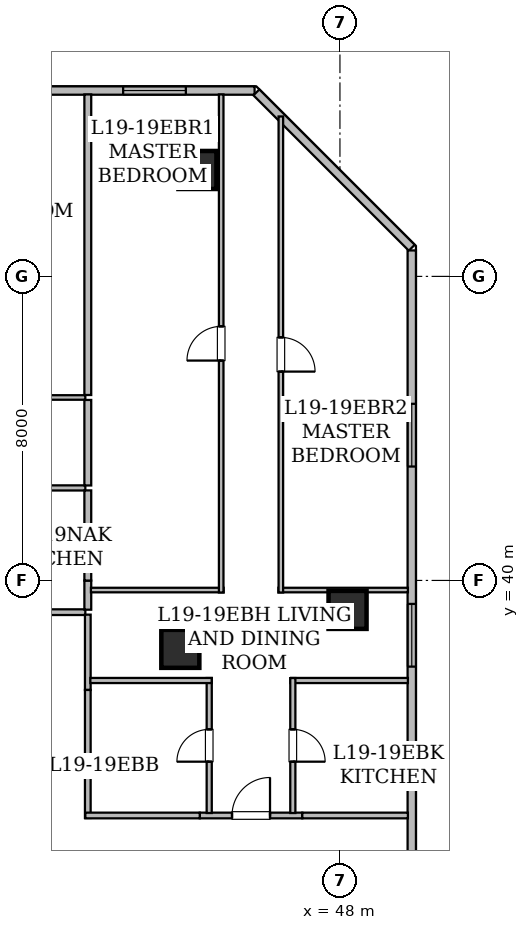
"""IFC4 building model, lengths in metres.
Left out: names, types, materials, properties, quantities, classifications, styles, units other than length and angle.
Written with IfcOpenShell. Run it as: python <this file> out.ifc"""

import sys

from ifc_helpers import new_model, si_unit, direction, frame, frame_2d, origin, origin_2d, place, context, subcontext, project, spatial, rectangle, hollow_rectangle, extrude, element, fill, save


model = new_model("IFC4")
c1 = context("Model", 3, precision=1e-05, world=origin(), true_north=direction((0.0, 1.0)))
c2 = subcontext(c1, "Body", "Model", "MODEL_VIEW")
j1 = project(units=[si_unit("LENGTHUNIT", "METRE"), si_unit("PLANEANGLEUNIT", "RADIAN")], contexts=[c1])
p1 = place(None, origin())
s1 = spatial("IfcSite", under=j1, at=p1, CompositionType="ELEMENT")
p2 = place(p1, origin())
s2 = spatial("IfcBuilding", under=s1, at=p2, CompositionType="ELEMENT")
p3 = place(p2, frame((0.0, 0.0, 77.1)))
s3 = spatial("IfcBuildingStorey", under=s2, at=p3, CompositionType="ELEMENT", Elevation=77.1)
for number, where, z_axis, x_axis in (
    (1, (44.25, 50.8, 0.0), (0.0, 0.0, 1.0), (1.0, 0.0, 0.0)),
    (2, (48.2, 39.225, 0.0), (0.0, 0.0, 1.0), (1.0, 0.0, 0.0)),
    (3, (43.8, 38.2, 0.0), (0.0, 0.0, 1.0), (1.0, 0.0, 0.0)),
):
    element("IfcColumn", number, at=place(p3, frame(where, z_axis=z_axis, x_axis=x_axis)), inside=s3, PredefinedType="COLUMN", context=c2, shape_type="SweptSolid", body=[
        extrude(hollow_rectangle(XDim=1.0, YDim=1.0, WallThickness=0.05, at=origin_2d()), origin(), (0.0, 0.0, 1.0), 3.65),
    ])
p4 = place(p3, frame((8.315, 52.89, 0.0), z_axis=(0.0, 0.0, 1.0), x_axis=(1.0, 0.0, 0.0)))
e4 = element("IfcWall", 4, at=p4, inside=s3, PredefinedType="STANDARD", context=c2, shape_type="SweptSolid", body=[
    extrude(rectangle(XDim=37.439, YDim=0.22, at=frame_2d((18.719, 0.0))), origin(), (0.0, 0.0, 1.0), 3.43),
])
p5 = place(p4, frame((5.093, 0.0, 0.85)))
e5 = element("IfcOpeningElement", 5, at=p5, cuts=e4, PredefinedType="OPENING", context=c2, shape_type="SweptSolid", body=[
    extrude(rectangle(XDim=1.65, YDim=1.55, at=frame_2d((0.825, 0.775))), frame((0.0, 0.12, 0.0), z_axis=(0.0, -1.0, 0.0), x_axis=(1.0, 0.0, 0.0)), (0.0, 0.0, 1.0), 0.24),
])
p6 = place(p4, frame((13.055, 0.0, 0.8)))
e6 = element("IfcOpeningElement", 6, at=p6, cuts=e4, PredefinedType="OPENING", context=c2, shape_type="SweptSolid", body=[
    extrude(rectangle(XDim=1.2, YDim=1.5, at=frame_2d((0.6, 0.75))), frame((0.0, 0.12, 0.0), z_axis=(0.0, -1.0, 0.0), x_axis=(1.0, 0.0, 0.0)), (0.0, 0.0, 1.0), 0.24),
])
p7 = place(p4, frame((10.005, 0.0, 0.85)))
e7 = element("IfcOpeningElement", 7, at=p7, cuts=e4, PredefinedType="OPENING", context=c2, shape_type="SweptSolid", body=[
    extrude(rectangle(XDim=1.65, YDim=1.55, at=frame_2d((0.825, 0.775))), frame((0.0, 0.12, 0.0), z_axis=(0.0, -1.0, 0.0), x_axis=(1.0, 0.0, 0.0)), (0.0, 0.0, 1.0), 0.24),
])
p8 = place(p4, frame((15.655, 0.0, 0.85)))
e8 = element("IfcOpeningElement", 8, at=p8, cuts=e4, PredefinedType="OPENING", context=c2, shape_type="SweptSolid", body=[
    extrude(rectangle(XDim=1.65, YDim=1.55, at=frame_2d((0.825, 0.775))), frame((0.0, 0.12, 0.0), z_axis=(0.0, -1.0, 0.0), x_axis=(1.0, 0.0, 0.0)), (0.0, 0.0, 1.0), 0.24),
])
p9 = place(p4, frame((25.185, 0.0, 0.8)))
e9 = element("IfcOpeningElement", 9, at=p9, cuts=e4, PredefinedType="OPENING", context=c2, shape_type="SweptSolid", body=[
    extrude(rectangle(XDim=1.2, YDim=1.5, at=frame_2d((0.6, 0.75))), frame((0.0, 0.12, 0.0), z_axis=(0.0, -1.0, 0.0), x_axis=(1.0, 0.0, 0.0)), (0.0, 0.0, 1.0), 0.24),
])
p10 = place(p4, frame((20.935, 0.0, 0.85)))
e10 = element("IfcOpeningElement", 10, at=p10, cuts=e4, PredefinedType="OPENING", context=c2, shape_type="SweptSolid", body=[
    extrude(rectangle(XDim=1.65, YDim=1.55, at=frame_2d((0.825, 0.775))), frame((0.0, 0.12, 0.0), z_axis=(0.0, -1.0, 0.0), x_axis=(1.0, 0.0, 0.0)), (0.0, 0.0, 1.0), 0.24),
])
p11 = place(p4, frame((28.985, 0.0, 0.85)))
e11 = element("IfcOpeningElement", 11, at=p11, cuts=e4, PredefinedType="OPENING", context=c2, shape_type="SweptSolid", body=[
    extrude(rectangle(XDim=1.65, YDim=1.55, at=frame_2d((0.825, 0.775))), frame((0.0, 0.12, 0.0), z_axis=(0.0, -1.0, 0.0), x_axis=(1.0, 0.0, 0.0)), (0.0, 0.0, 1.0), 0.24),
])
p12 = place(p4, frame((33.98, 0.0, 0.85)))
e12 = element("IfcOpeningElement", 12, at=p12, cuts=e4, PredefinedType="OPENING", context=c2, shape_type="SweptSolid", body=[
    extrude(rectangle(XDim=1.65, YDim=1.55, at=frame_2d((0.825, 0.775))), frame((0.0, 0.12, 0.0), z_axis=(0.0, -1.0, 0.0), x_axis=(1.0, 0.0, 0.0)), (0.0, 0.0, 1.0), 0.24),
])
p13 = place(p3, frame((45.802, 52.842, 0.0), z_axis=(0.0, 0.0, 1.0), x_axis=(0.707085666273, -0.70712789547, 0.0)))
e13 = element("IfcWall", 13, at=p13, inside=s3, PredefinedType="STANDARD", context=c2, shape_type="SweptSolid", body=[
    extrude(rectangle(XDim=5.781, YDim=0.22, at=frame_2d((2.891, 0.0))), origin(), (0.0, 0.0, 1.0), 3.43),
])
p14 = place(p3, frame((49.89, 48.683, 0.0), z_axis=(0.0, 0.0, 1.0), x_axis=(0.0, -1.0, 0.0)))
e14 = element("IfcWall", 14, at=p14, inside=s3, PredefinedType="STANDARD", context=c2, shape_type="SweptSolid", body=[
    extrude(rectangle(XDim=17.446, YDim=0.22, at=frame_2d((8.723, 0.0))), origin(), (0.0, 0.0, 1.0), 3.43),
])
p15 = place(p14, frame((9.301, 0.0, 0.85)))
e15 = element("IfcOpeningElement", 15, at=p15, cuts=e14, PredefinedType="OPENING", context=c2, shape_type="SweptSolid", body=[
    extrude(rectangle(XDim=1.65, YDim=1.55, at=frame_2d((0.825, 0.775))), frame((0.0, 0.12, 0.0), z_axis=(0.0, -1.0, 0.0), x_axis=(1.0, 0.0, 0.0)), (0.0, 0.0, 1.0), 0.24),
])
p16 = place(p14, frame((4.036, 0.0, 0.85)))
e16 = element("IfcOpeningElement", 16, at=p16, cuts=e14, PredefinedType="OPENING", context=c2, shape_type="SweptSolid", body=[
    extrude(rectangle(XDim=1.65, YDim=1.55, at=frame_2d((0.825, 0.775))), frame((0.0, 0.12, 0.0), z_axis=(0.0, -1.0, 0.0), x_axis=(1.0, 0.0, 0.0)), (0.0, 0.0, 1.0), 0.24),
])
p17 = place(p3, frame((34.299, 39.165, 0.0), z_axis=(0.0, 0.0, 1.0), x_axis=(1.0, 0.0, 0.0)))
e17 = element("IfcWall", 17, at=p17, inside=s3, PredefinedType="STANDARD", context=c2, shape_type="SweptSolid", body=[
    extrude(rectangle(XDim=7.001, YDim=0.15, at=frame_2d((3.5, 0.0))), origin(), (0.0, 0.0, 1.0), 3.43),
])
p18 = place(p3, frame((41.365, 39.1, 0.0), z_axis=(0.0, 0.0, 1.0), x_axis=(0.0, -1.0, 0.0)))
e18 = element("IfcWall", 18, at=p18, inside=s3, PredefinedType="STANDARD", context=c2, shape_type="SweptSolid", body=[
    extrude(rectangle(XDim=1.982, YDim=0.15, at=frame_2d((0.991, 0.0))), origin(), (0.0, 0.0, 1.0), 2.647),
])
p19 = place(p3, frame((44.311, 33.815, 0.0), z_axis=(0.0, 0.0, 1.0), x_axis=(1.0, 0.0, 0.0)))
e19 = element("IfcWall", 19, at=p19, inside=s3, PredefinedType="STANDARD", context=c2, shape_type="SweptSolid", body=[
    extrude(rectangle(XDim=2.698, YDim=0.15, at=frame_2d((1.349, 0.0))), origin(), (0.0, 0.0, 1.0), 3.43),
])
p20 = place(p19, frame((0.849, 0.0, 0.0)))
e20 = element("IfcOpeningElement", 20, at=p20, cuts=e19, PredefinedType="OPENING", context=c2, shape_type="SweptSolid", body=[
    extrude(rectangle(XDim=1.0, YDim=2.15, at=frame_2d((0.5, 1.075))), frame((0.0, 0.085, 0.0), z_axis=(0.0, -1.0, 0.0), x_axis=(1.0, 0.0, 0.0)), (0.0, 0.0, 1.0), 0.17),
])
p21 = place(p3, frame((41.365, 37.118, 0.0), z_axis=(0.0, 0.0, 1.0), x_axis=(0.0, -1.0, 0.0)))
e21 = element("IfcWall", 21, at=p21, inside=s3, PredefinedType="STANDARD", context=c2, shape_type="SweptSolid", body=[
    extrude(rectangle(XDim=3.368, YDim=0.15, at=frame_2d((1.684, 0.0))), origin(), (0.0, 0.0, 1.0), 3.43),
])
p22 = place(p3, frame((41.3, 33.815, 0.0), z_axis=(0.0, 0.0, 1.0), x_axis=(1.0, 0.0, 0.0)))
e22 = element("IfcWall", 22, at=p22, inside=s3, PredefinedType="STANDARD", context=c2, shape_type="SweptSolid", body=[
    extrude(rectangle(XDim=3.011, YDim=0.15, at=frame_2d((1.505, 0.0))), origin(), (0.0, 0.0, 1.0), 2.647),
])
p23 = place(p3, frame((47.009, 33.815, 0.0), z_axis=(0.0, 0.0, 1.0), x_axis=(1.0, 0.0, 0.0)))
e23 = element("IfcWall", 23, at=p23, inside=s3, PredefinedType="STANDARD", context=c2, shape_type="SweptSolid", body=[
    extrude(rectangle(XDim=2.779, YDim=0.15, at=frame_2d((1.39, 0.0))), origin(), (0.0, 0.0, 1.0), 2.803),
])
p24 = place(p3, frame((41.3, 42.434, 0.0), z_axis=(0.0, 0.0, 1.0), x_axis=(-1.0, 0.0, 0.0)))
e24 = element("IfcWall", 24, at=p24, inside=s3, PredefinedType="PARTITIONING", context=c2, shape_type="SweptSolid", body=[
    extrude(rectangle(XDim=7.315, YDim=0.135, at=frame_2d((3.657, 0.0))), origin(), (0.0, 0.0, 1.0), 2.961),
])
p25 = place(p24, frame((3.233, 0.0, 0.0)))
e25 = element("IfcOpeningElement", 25, at=p25, cuts=e24, PredefinedType="OPENING", context=c2, shape_type="SweptSolid", body=[
    extrude(rectangle(XDim=0.85, YDim=2.1, at=frame_2d((0.425, 1.05))), frame((0.0, 0.077, 0.0), z_axis=(0.0, -1.0, 0.0), x_axis=(1.0, 0.0, 0.0)), (0.0, 0.0, 1.0), 0.155),
])
p26 = place(p3, frame((34.82, 44.814, 0.0), z_axis=(0.0, 0.0, 1.0), x_axis=(1.0, 0.0, 0.0)))
e26 = element("IfcWall", 26, at=p26, inside=s3, PredefinedType="PARTITIONING", context=c2, shape_type="SweptSolid", body=[
    extrude(rectangle(XDim=6.48, YDim=0.12, at=frame_2d((3.24, 0.0))), origin(), (0.0, 0.0, 1.0), 3.43),
])
p27 = place(p3, frame((41.365, 44.749, 0.0), z_axis=(0.0, 0.0, 1.0), x_axis=(0.0, -1.0, 0.0)))
e27 = element("IfcWall", 27, at=p27, inside=s3, PredefinedType="STANDARD", context=c2, shape_type="SweptSolid", body=[
    extrude(rectangle(XDim=2.25, YDim=0.18, at=frame_2d((1.125, 0.0))), origin(), (0.0, 0.0, 1.0), 2.961),
])
p28 = place(p3, frame((41.365, 39.996, 0.0), z_axis=(0.0, 0.0, 1.0), x_axis=(0.0, -1.0, 0.0)))
e28 = element("IfcWall", 28, at=p28, inside=s3, PredefinedType="STANDARD", context=c2, shape_type="SweptSolid", body=[
    extrude(rectangle(XDim=0.766, YDim=0.18, at=frame_2d((0.383, 0.0))), origin(), (0.0, 0.0, 1.0), 3.43),
])
p29 = place(p3, frame((41.365, 42.369, 0.0), z_axis=(0.0, 0.0, 1.0), x_axis=(0.0, -1.0, 0.0)))
e29 = element("IfcWall", 29, at=p29, inside=s3, PredefinedType="STANDARD", context=c2, shape_type="SweptSolid", body=[
    extrude(rectangle(XDim=2.373, YDim=0.18, at=frame_2d((1.187, 0.0))), origin(), (0.0, 0.0, 1.0), 3.43),
])
p30 = place(p3, frame((41.365, 52.788, 0.0), z_axis=(0.0, 0.0, 1.0), x_axis=(0.0, -1.0, 0.0)))
e30 = element("IfcWall", 30, at=p30, inside=s3, PredefinedType="STANDARD", context=c2, shape_type="SweptSolid", body=[
    extrude(rectangle(XDim=7.909, YDim=0.18, at=frame_2d((3.955, 0.0))), origin(), (0.0, 0.0, 1.0), 2.803),
])
p31 = place(p3, frame((44.56, 33.88, 0.0), z_axis=(0.0, 0.0, 1.0), x_axis=(0.0, 1.0, 0.0)))
e31 = element("IfcWall", 31, at=p31, inside=s3, PredefinedType="PARTITIONING", context=c2, shape_type="SweptSolid", body=[
    extrude(rectangle(XDim=3.552, YDim=0.135, at=frame_2d((1.776, 0.0))), origin(), (0.0, 0.0, 1.0), 3.43),
])
p32 = place(p31, frame((1.351, 0.0, 0.0)))
e32 = element("IfcOpeningElement", 32, at=p32, cuts=e31, PredefinedType="OPENING", context=c2, shape_type="SweptSolid", body=[
    extrude(rectangle(XDim=0.85, YDim=2.1, at=frame_2d((0.425, 1.05))), frame((0.0, 0.077, 0.0), z_axis=(0.0, -1.0, 0.0), x_axis=(1.0, 0.0, 0.0)), (0.0, 0.0, 1.0), 0.155),
])
p33 = place(p3, frame((44.625, 37.367, 0.0), z_axis=(0.0, 0.0, 1.0), x_axis=(-1.0, 0.0, 0.0)))
e33 = element("IfcWall", 33, at=p33, inside=s3, PredefinedType="PARTITIONING", context=c2, shape_type="SweptSolid", body=[
    extrude(rectangle(XDim=3.193, YDim=0.135, at=frame_2d((1.597, 0.0))), origin(), (0.0, 0.0, 1.0), 2.647),
])
p34 = place(p3, frame((49.788, 37.367, 0.0), z_axis=(0.0, 0.0, 1.0), x_axis=(-1.0, 0.0, 0.0)))
e34 = element("IfcWall", 34, at=p34, inside=s3, PredefinedType="PARTITIONING", context=c2, shape_type="SweptSolid", body=[
    extrude(rectangle(XDim=3.093, YDim=0.135, at=frame_2d((1.546, 0.0))), origin(), (0.0, 0.0, 1.0), 2.803),
])
p35 = place(p3, frame((46.76, 37.432, 0.0), z_axis=(0.0, 0.0, 1.0), x_axis=(0.0, -1.0, 0.0)))
e35 = element("IfcWall", 35, at=p35, inside=s3, PredefinedType="PARTITIONING", context=c2, shape_type="SweptSolid", body=[
    extrude(rectangle(XDim=3.552, YDim=0.135, at=frame_2d((1.776, 0.0))), origin(), (0.0, 0.0, 1.0), 3.43),
])
p36 = place(p35, frame((1.351, 0.0, 0.0)))
e36 = element("IfcOpeningElement", 36, at=p36, cuts=e35, PredefinedType="OPENING", context=c2, shape_type="SweptSolid", body=[
    extrude(rectangle(XDim=0.85, YDim=2.1, at=frame_2d((0.425, 1.05))), frame((0.0, 0.077, 0.0), z_axis=(0.0, -1.0, 0.0), x_axis=(1.0, 0.0, 0.0)), (0.0, 0.0, 1.0), 0.155),
])
p37 = place(p3, frame((41.447, 39.747, 0.0), z_axis=(0.0, 0.0, 1.0), x_axis=(1.0, 0.0, 0.0)))
e37 = element("IfcWall", 37, at=p37, inside=s3, PredefinedType="PARTITIONING", context=c2, shape_type="SweptSolid", body=[
    extrude(rectangle(XDim=3.493, YDim=0.12, at=frame_2d((1.747, 0.0))), origin(), (0.0, 0.0, 1.0), 2.647),
])
p38 = place(p3, frame((44.875, 39.682, 0.0), z_axis=(0.0, 0.0, 1.0), x_axis=(0.0, 1.0, 0.0)))
e38 = element("IfcWall", 38, at=p38, inside=s3, PredefinedType="PARTITIONING", context=c2, shape_type="SweptSolid", body=[
    extrude(rectangle(XDim=13.106, YDim=0.12, at=frame_2d((6.553, 0.0))), origin(), (0.0, 0.0, 1.0), 2.803),
])
p39 = place(p38, frame((6.103, 0.0, 0.0)))
e39 = element("IfcOpeningElement", 39, at=p39, cuts=e38, PredefinedType="OPENING", context=c2, shape_type="SweptSolid", body=[
    extrude(rectangle(XDim=0.9, YDim=2.1, at=frame_2d((0.45, 1.05))), frame((0.0, 0.07, 0.0), z_axis=(0.0, -1.0, 0.0), x_axis=(1.0, 0.0, 0.0)), (0.0, 0.0, 1.0), 0.14),
])
p40 = place(p3, frame((46.38, 39.747, 0.0), z_axis=(0.0, 0.0, 1.0), x_axis=(1.0, 0.0, 0.0)))
e40 = element("IfcWall", 40, at=p40, inside=s3, PredefinedType="PARTITIONING", context=c2, shape_type="SweptSolid", body=[
    extrude(rectangle(XDim=3.408, YDim=0.12, at=frame_2d((1.704, 0.0))), origin(), (0.0, 0.0, 1.0), 2.803),
])
p41 = place(p3, frame((46.445, 52.208, 0.0), z_axis=(0.0, 0.0, 1.0), x_axis=(0.0, -1.0, 0.0)))
e41 = element("IfcWall", 41, at=p41, inside=s3, PredefinedType="PARTITIONING", context=c2, shape_type="SweptSolid", body=[
    extrude(rectangle(XDim=12.526, YDim=0.12, at=frame_2d((6.263, 0.0))), origin(), (0.0, 0.0, 1.0), 2.803),
])
p42 = place(p41, frame((5.813, 0.0, 0.0)))
e42 = element("IfcOpeningElement", 42, at=p42, cuts=e41, PredefinedType="OPENING", context=c2, shape_type="SweptSolid", body=[
    extrude(rectangle(XDim=0.9, YDim=2.1, at=frame_2d((0.45, 1.05))), frame((0.0, 0.07, 0.0), z_axis=(0.0, -1.0, 0.0), x_axis=(1.0, 0.0, 0.0)), (0.0, 0.0, 1.0), 0.14),
])
p43 = place(p15, origin())
e43 = element("IfcWindow", 43, at=p43, inside=s3, PartitioningType="SINGLE_PANEL", PredefinedType="WINDOW", context=c2, shape_type="SweptSolid", body=[
    extrude(rectangle(XDim=1.65, YDim=1.55, at=frame_2d((0.825, 0.775))), frame((0.0, 0.03, 0.0), z_axis=(0.0, -1.0, 0.0), x_axis=(1.0, 0.0, 0.0)), (0.0, 0.0, 1.0), 0.06),
])
fill(e15, e43)
p44 = place(p12, origin())
e44 = element("IfcWindow", 44, at=p44, inside=s3, PartitioningType="SINGLE_PANEL", PredefinedType="WINDOW", context=c2, shape_type="SweptSolid", body=[
    extrude(rectangle(XDim=1.65, YDim=1.55, at=frame_2d((0.825, 0.775))), frame((0.0, 0.03, 0.0), z_axis=(0.0, -1.0, 0.0), x_axis=(1.0, 0.0, 0.0)), (0.0, 0.0, 1.0), 0.06),
])
fill(e12, e44)
p45 = place(p16, origin())
e45 = element("IfcWindow", 45, at=p45, inside=s3, PartitioningType="SINGLE_PANEL", PredefinedType="WINDOW", context=c2, shape_type="SweptSolid", body=[
    extrude(rectangle(XDim=1.65, YDim=1.55, at=frame_2d((0.825, 0.775))), frame((0.0, 0.03, 0.0), z_axis=(0.0, -1.0, 0.0), x_axis=(1.0, 0.0, 0.0)), (0.0, 0.0, 1.0), 0.06),
])
fill(e16, e45)
p46 = place(p20, origin())
e46 = element("IfcDoor", 46, at=p46, inside=s3, OperationType="SINGLE_SWING_RIGHT", PredefinedType="DOOR", context=c2, shape_type="SweptSolid", body=[
    extrude(rectangle(XDim=1.0, YDim=2.15, at=frame_2d((0.5, 1.075))), frame((0.0, 0.025, 0.0), z_axis=(0.0, -1.0, 0.0), x_axis=(1.0, 0.0, 0.0)), (0.0, 0.0, 1.0), 0.05),
])
fill(e20, e46)
p47 = place(p32, origin())
e47 = element("IfcDoor", 47, at=p47, inside=s3, OperationType="SINGLE_SWING_LEFT", PredefinedType="DOOR", context=c2, shape_type="SweptSolid", body=[
    extrude(rectangle(XDim=0.85, YDim=2.1, at=frame_2d((0.425, 1.05))), frame((0.0, 0.025, 0.0), z_axis=(0.0, -1.0, 0.0), x_axis=(1.0, 0.0, 0.0)), (0.0, 0.0, 1.0), 0.05),
])
fill(e32, e47)
p48 = place(p36, origin())
e48 = element("IfcDoor", 48, at=p48, inside=s3, OperationType="SINGLE_SWING_RIGHT", PredefinedType="DOOR", context=c2, shape_type="SweptSolid", body=[
    extrude(rectangle(XDim=0.85, YDim=2.1, at=frame_2d((0.425, 1.05))), frame((0.0, 0.025, 0.0), z_axis=(0.0, -1.0, 0.0), x_axis=(1.0, 0.0, 0.0)), (0.0, 0.0, 1.0), 0.05),
])
fill(e36, e48)
p49 = place(p39, origin())
e49 = element("IfcDoor", 49, at=p49, inside=s3, OperationType="SINGLE_SWING_LEFT", PredefinedType="DOOR", context=c2, shape_type="SweptSolid", body=[
    extrude(rectangle(XDim=0.9, YDim=2.1, at=frame_2d((0.45, 1.05))), frame((0.0, 0.025, 0.0), z_axis=(0.0, -1.0, 0.0), x_axis=(1.0, 0.0, 0.0)), (0.0, 0.0, 1.0), 0.05),
])
fill(e39, e49)
p50 = place(p42, origin())
e50 = element("IfcDoor", 50, at=p50, inside=s3, OperationType="SINGLE_SWING_RIGHT", PredefinedType="DOOR", context=c2, shape_type="SweptSolid", body=[
    extrude(rectangle(XDim=0.9, YDim=2.1, at=frame_2d((0.45, 1.05))), frame((0.0, 0.025, 0.0), z_axis=(0.0, -1.0, 0.0), x_axis=(1.0, 0.0, 0.0)), (0.0, 0.0, 1.0), 0.05),
])
fill(e42, e50)
save(model, sys.argv[1])
